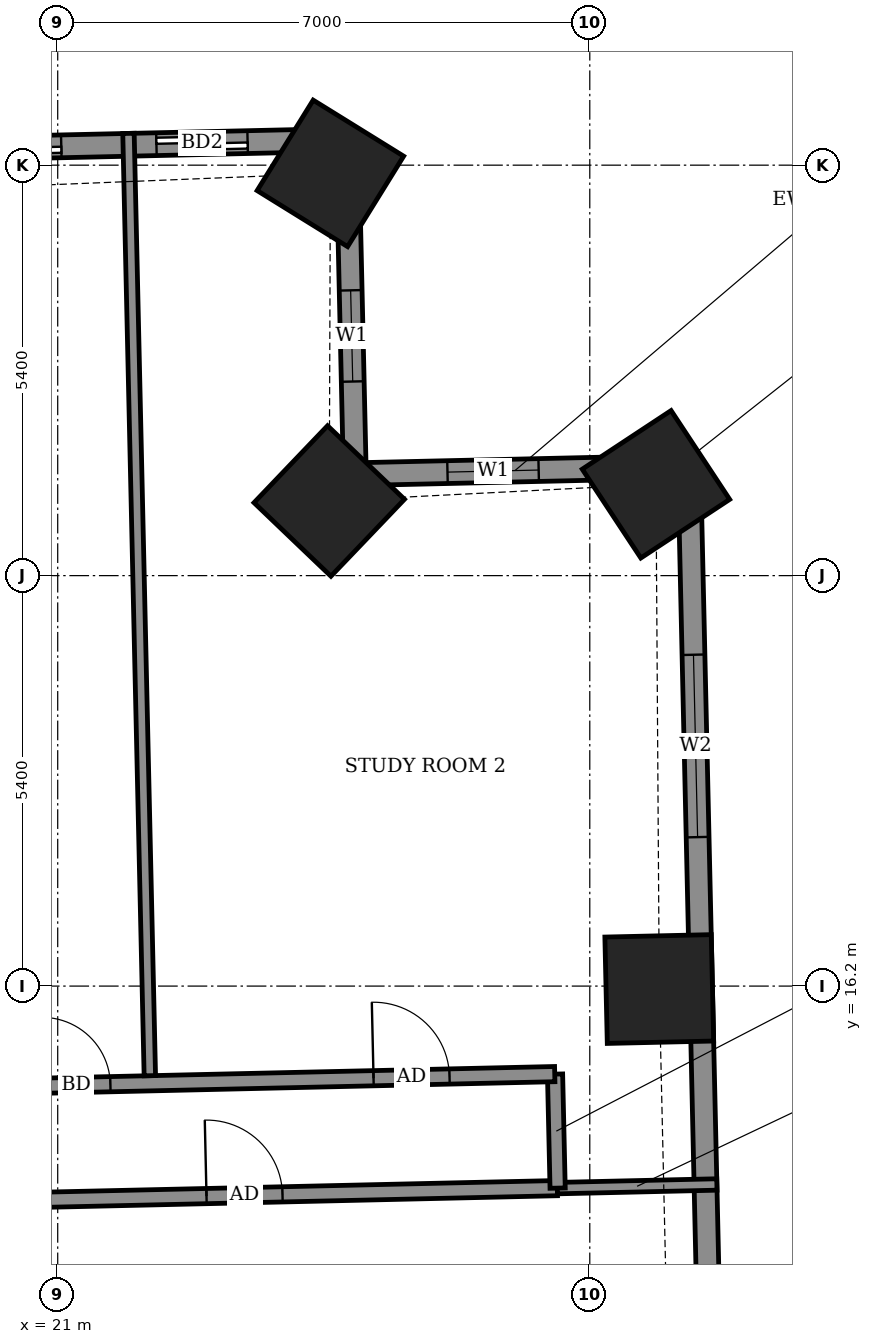
"""IFC4 building model, lengths in metres.
Left out: names, types, materials, properties, quantities, classifications, styles, units other than length and angle.
Written with IfcOpenShell. Run it as: python <this file> out.ifc"""

import sys

from ifc_helpers import new_model, si_unit, direction, frame, frame_2d, origin, origin_2d, place, context, subcontext, project, spatial, rectangle, extrude, element, fill, save


model = new_model("IFC4")
c1 = context("Model", 3, precision=1e-05, world=origin(), true_north=direction((0.0, 1.0)))
c2 = subcontext(c1, "Body", "Model", "MODEL_VIEW")
j1 = project(units=[si_unit("LENGTHUNIT", "METRE"), si_unit("PLANEANGLEUNIT", "RADIAN")], contexts=[c1])
p1 = place(None, origin())
s1 = spatial("IfcSite", under=j1, at=p1, CompositionType="ELEMENT")
p2 = place(p1, origin())
s2 = spatial("IfcBuilding", under=s1, at=p2, CompositionType="ELEMENT")
p3 = place(p2, frame((0.0, 0.0, 93.7)))
s3 = spatial("IfcBuildingStorey", under=s2, at=p3, CompositionType="ELEMENT", Elevation=93.7)
for number, where, z_axis, x_axis in (
    (1, (28.914, 16.161, -0.55), (0.0, 0.0, 1.0), (-0.023, 1.0, 0.0)),
    (2, (28.871, 22.802, -0.55), (0.0, 0.0, 1.0), (-0.551, 0.835, 0.0)),
    (3, (24.572, 22.582, -0.55), (0.0, 0.0, 1.0), (-0.723, 0.691, 0.0)),
    (4, (24.587, 26.892, -0.55), (0.0, 0.0, 1.0), (-0.85, 0.527, 0.0)),
):
    element("IfcColumn", number, at=place(p3, frame(where, z_axis=z_axis, x_axis=x_axis)), inside=s3, PredefinedType="COLUMN", context=c2, shape_type="SweptSolid", body=[
        extrude(rectangle(XDim=1.4, YDim=1.4, at=origin_2d()), origin(), (0.0, 0.0, 1.0), 3.6),
    ])
p4 = place(p3, frame((29.624, 9.108, 0.0), z_axis=(0.0, 0.0, 1.0), x_axis=(-0.022679601751, 0.999742784752, 0.0)))
e5 = element("IfcWall", 5, at=p4, inside=s3, PredefinedType="SOLIDWALL", context=c2, shape_type="SweptSolid", body=[
    extrude(rectangle(XDim=13.93, YDim=0.3, at=frame_2d((6.965, 0.0))), origin(), (0.0, 0.0, 1.0), 3.05),
])
p5 = place(p4, frame((1.742, 0.0, 0.0)))
e6 = element("IfcOpeningElement", 6, at=p5, cuts=e5, PredefinedType="OPENING", context=c2, shape_type="SweptSolid", body=[
    extrude(rectangle(XDim=1.5, YDim=2.4, at=frame_2d((0.75, 1.2))), frame((0.0, 0.16, 0.0), z_axis=(0.0, -1.0, 0.0), x_axis=(1.0, 0.0, 0.0)), (0.0, 0.0, 1.0), 0.32),
])
p6 = place(p4, frame((9.054, 0.0, 0.9)))
e7 = element("IfcOpeningElement", 7, at=p6, cuts=e5, PredefinedType="OPENING", context=c2, shape_type="SweptSolid", body=[
    extrude(rectangle(XDim=2.4, YDim=1.5, at=frame_2d((1.2, 0.75))), frame((0.0, 0.16, 0.0), z_axis=(0.0, -1.0, 0.0), x_axis=(1.0, 0.0, 0.0)), (0.0, 0.0, 1.0), 0.32),
])
p7 = place(p3, frame((29.308, 23.034, 0.0), z_axis=(0.0, 0.0, 1.0), x_axis=(-0.999742851358, -0.022676665496, 0.0)))
e8 = element("IfcWall", 8, at=p7, inside=s3, PredefinedType="SOLIDWALL", context=c2, shape_type="SweptSolid", body=[
    extrude(rectangle(XDim=4.586, YDim=0.3, at=frame_2d((2.293, 0.0))), origin(), (0.0, 0.0, 1.0), 2.55),
])
p8 = place(p7, frame((1.981, 0.0, 0.9)))
e9 = element("IfcOpeningElement", 9, at=p8, cuts=e8, PredefinedType="OPENING", context=c2, shape_type="SweptSolid", body=[
    extrude(rectangle(XDim=1.2, YDim=1.5, at=frame_2d((0.6, 0.75))), frame((0.0, 0.16, 0.0), z_axis=(0.0, -1.0, 0.0), x_axis=(1.0, 0.0, 0.0)), (0.0, 0.0, 1.0), 0.32),
])
p9 = place(p3, frame((24.909, 22.934, 0.0), z_axis=(0.0, 0.0, 1.0), x_axis=(-0.022693676786, 0.999742465355, 0.0)))
e10 = element("IfcWall", 10, at=p9, inside=s3, PredefinedType="SOLIDWALL", context=c2, shape_type="SweptSolid", body=[
    extrude(rectangle(XDim=4.4, YDim=0.3, at=frame_2d((2.2, 0.0))), origin(), (0.0, 0.0, 1.0), 2.55),
])
p10 = place(p9, frame((1.22, 0.0, 0.9)))
e11 = element("IfcOpeningElement", 11, at=p10, cuts=e10, PredefinedType="OPENING", context=c2, shape_type="SweptSolid", body=[
    extrude(rectangle(XDim=1.2, YDim=1.5, at=frame_2d((0.6, 0.75))), frame((0.0, 0.16, 0.0), z_axis=(0.0, -1.0, 0.0), x_axis=(1.0, 0.0, 0.0)), (0.0, 0.0, 1.0), 0.32),
])
p11 = place(p3, frame((24.809, 27.333, 0.0), z_axis=(0.0, 0.0, 1.0), x_axis=(-0.999742676884, -0.022684356233, 0.0)))
e12 = element("IfcWall", 12, at=p11, inside=s3, PredefinedType="SOLIDWALL", context=c2, shape_type="SweptSolid", body=[
    extrude(rectangle(XDim=47.301, YDim=0.3, at=frame_2d((23.651, 0.0))), origin(), (0.0, 0.0, 1.0), 3.05),
])
p12 = place(p11, frame((1.311, 0.0, 0.0)))
e13 = element("IfcOpeningElement", 13, at=p12, cuts=e12, PredefinedType="OPENING", context=c2, shape_type="SweptSolid", body=[
    extrude(rectangle(XDim=1.2, YDim=2.4, at=frame_2d((0.6, 1.2))), frame((0.0, 0.16, 0.0), z_axis=(0.0, -1.0, 0.0), x_axis=(1.0, 0.0, 0.0)), (0.0, 0.0, 1.0), 0.32),
])
p13 = place(p11, frame((3.763, 0.0, 0.0)))
e14 = element("IfcOpeningElement", 14, at=p13, cuts=e12, PredefinedType="OPENING", context=c2, shape_type="SweptSolid", body=[
    extrude(rectangle(XDim=1.5, YDim=2.4, at=frame_2d((0.75, 1.2))), frame((0.0, 0.16, 0.0), z_axis=(0.0, -1.0, 0.0), x_axis=(1.0, 0.0, 0.0)), (0.0, 0.0, 1.0), 0.32),
])
p14 = place(p11, frame((8.647, 0.0, 0.0)))
e15 = element("IfcOpeningElement", 15, at=p14, cuts=e12, PredefinedType="OPENING", context=c2, shape_type="SweptSolid", body=[
    extrude(rectangle(XDim=1.5, YDim=2.4, at=frame_2d((0.75, 1.2))), frame((0.0, 0.16, 0.0), z_axis=(0.0, -1.0, 0.0), x_axis=(1.0, 0.0, 0.0)), (0.0, 0.0, 1.0), 0.32),
])
p15 = place(p11, frame((14.239, 0.0, 0.0)))
e16 = element("IfcOpeningElement", 16, at=p15, cuts=e12, PredefinedType="OPENING", context=c2, shape_type="SweptSolid", body=[
    extrude(rectangle(XDim=1.2, YDim=2.4, at=frame_2d((0.6, 1.2))), frame((0.0, 0.16, 0.0), z_axis=(0.0, -1.0, 0.0), x_axis=(1.0, 0.0, 0.0)), (0.0, 0.0, 1.0), 0.32),
])
p16 = place(p11, frame((17.016, 0.0, 0.0)))
e17 = element("IfcOpeningElement", 17, at=p16, cuts=e12, PredefinedType="OPENING", context=c2, shape_type="SweptSolid", body=[
    extrude(rectangle(XDim=1.5, YDim=2.4, at=frame_2d((0.75, 1.2))), frame((0.0, 0.16, 0.0), z_axis=(0.0, -1.0, 0.0), x_axis=(1.0, 0.0, 0.0)), (0.0, 0.0, 1.0), 0.32),
])
p17 = place(p11, frame((21.816, 0.0, 0.0)))
e18 = element("IfcOpeningElement", 18, at=p17, cuts=e12, PredefinedType="OPENING", context=c2, shape_type="SweptSolid", body=[
    extrude(rectangle(XDim=1.5, YDim=2.4, at=frame_2d((0.75, 1.2))), frame((0.0, 0.16, 0.0), z_axis=(0.0, -1.0, 0.0), x_axis=(1.0, 0.0, 0.0)), (0.0, 0.0, 1.0), 0.32),
])
p18 = place(p11, frame((24.817, 0.0, 0.0)))
e19 = element("IfcOpeningElement", 19, at=p18, cuts=e12, PredefinedType="OPENING", context=c2, shape_type="SweptSolid", body=[
    extrude(rectangle(XDim=1.2, YDim=2.4, at=frame_2d((0.6, 1.2))), frame((0.0, 0.16, 0.0), z_axis=(0.0, -1.0, 0.0), x_axis=(1.0, 0.0, 0.0)), (0.0, 0.0, 1.0), 0.32),
])
p19 = place(p11, frame((30.244, 0.0, 0.0)))
e20 = element("IfcOpeningElement", 20, at=p19, cuts=e12, PredefinedType="OPENING", context=c2, shape_type="SweptSolid", body=[
    extrude(rectangle(XDim=1.5, YDim=2.4, at=frame_2d((0.75, 1.2))), frame((0.0, 0.16, 0.0), z_axis=(0.0, -1.0, 0.0), x_axis=(1.0, 0.0, 0.0)), (0.0, 0.0, 1.0), 0.32),
])
p20 = place(p11, frame((35.069, 0.0, 0.0)))
e21 = element("IfcOpeningElement", 21, at=p20, cuts=e12, PredefinedType="OPENING", context=c2, shape_type="SweptSolid", body=[
    extrude(rectangle(XDim=1.5, YDim=2.4, at=frame_2d((0.75, 1.2))), frame((0.0, 0.16, 0.0), z_axis=(0.0, -1.0, 0.0), x_axis=(1.0, 0.0, 0.0)), (0.0, 0.0, 1.0), 0.32),
])
p21 = place(p11, frame((37.995, 0.0, 0.0)))
e22 = element("IfcOpeningElement", 22, at=p21, cuts=e12, PredefinedType="OPENING", context=c2, shape_type="SweptSolid", body=[
    extrude(rectangle(XDim=1.5, YDim=2.4, at=frame_2d((0.75, 1.2))), frame((0.0, 0.16, 0.0), z_axis=(0.0, -1.0, 0.0), x_axis=(1.0, 0.0, 0.0)), (0.0, 0.0, 1.0), 0.32),
])
p22 = place(p11, frame((42.674, 0.0, 0.9)))
e23 = element("IfcOpeningElement", 23, at=p22, cuts=e12, PredefinedType="OPENING", context=c2, shape_type="SweptSolid", body=[
    extrude(rectangle(XDim=2.4, YDim=1.5, at=frame_2d((1.2, 0.75))), frame((0.0, 0.16, 0.0), z_axis=(0.0, -1.0, 0.0), x_axis=(1.0, 0.0, 0.0)), (0.0, 0.0, 1.0), 0.32),
])
p23 = place(p3, frame((17.176, 13.306, 0.0), z_axis=(0.0, 0.0, 1.0), x_axis=(0.999742295888, 0.022701141223, 0.0)))
e24 = element("IfcWall", 24, at=p23, inside=s3, PredefinedType="PARTITIONING", context=c2, shape_type="SweptSolid", body=[
    extrude(rectangle(XDim=10.4, YDim=0.2, at=frame_2d((5.2, 0.0))), origin(), (0.0, 0.0, 1.0), 3.05),
])
p24 = place(p23, frame((5.783, 0.0, 0.0)))
e25 = element("IfcOpeningElement", 25, at=p24, cuts=e24, PredefinedType="OPENING", context=c2, shape_type="SweptSolid", body=[
    extrude(rectangle(XDim=1.0, YDim=2.1, at=frame_2d((0.5, 1.05))), frame((0.0, 0.11, 0.0), z_axis=(0.0, -1.0, 0.0), x_axis=(1.0, 0.0, 0.0)), (0.0, 0.0, 1.0), 0.22),
])
p25 = place(p3, frame((27.573, 13.542, 0.0), z_axis=(0.0, 0.0, 1.0), x_axis=(0.999737616439, 0.022906293375, 0.0)))
e26 = element("IfcWall", 26, at=p25, inside=s3, PredefinedType="PARTITIONING", context=c2, shape_type="SweptSolid", body=[
    extrude(rectangle(XDim=2.1, YDim=0.15, at=frame_2d((1.05, 0.0))), origin(), (0.0, 0.0, 1.0), 2.55),
])
p26 = place(p3, frame((27.577, 13.542, 0.0), z_axis=(0.0, 0.0, 1.0), x_axis=(-0.022617910375, 0.999744182344, 0.0)))
e27 = element("IfcWall", 27, at=p26, inside=s3, PredefinedType="PARTITIONING", context=c2, shape_type="SweptSolid", body=[
    extrude(rectangle(XDim=1.5, YDim=0.2, at=frame_2d((0.75, 0.0))), origin(), (0.0, 0.0, 1.0), 3.05),
])
p27 = place(p3, frame((-24.92, 13.851, 0.0), z_axis=(0.0, 0.0, 1.0), x_axis=(0.999742411711, 0.022696039895, 0.0)))
e28 = element("IfcWall", 28, at=p27, inside=s3, PredefinedType="PARTITIONING", context=c2, shape_type="SweptSolid", body=[
    extrude(rectangle(XDim=52.472, YDim=0.2, at=frame_2d((26.236, 0.0))), origin(), (0.0, 0.0, 1.0), 3.05),
])
p28 = place(p27, frame((50.088, 0.0, 0.0)))
e29 = element("IfcOpeningElement", 29, at=p28, cuts=e28, PredefinedType="OPENING", context=c2, shape_type="SweptSolid", body=[
    extrude(rectangle(XDim=1.0, YDim=2.1, at=frame_2d((0.5, 1.05))), frame((0.0, 0.11, 0.0), z_axis=(0.0, -1.0, 0.0), x_axis=(1.0, 0.0, 0.0)), (0.0, 0.0, 1.0), 0.22),
])
p29 = place(p27, frame((45.725, 0.0, 0.0)))
e30 = element("IfcOpeningElement", 30, at=p29, cuts=e28, PredefinedType="OPENING", context=c2, shape_type="SweptSolid", body=[
    extrude(rectangle(XDim=0.9, YDim=2.1, at=frame_2d((0.45, 1.05))), frame((0.0, 0.11, 0.0), z_axis=(0.0, -1.0, 0.0), x_axis=(1.0, 0.0, 0.0)), (0.0, 0.0, 1.0), 0.22),
])
p30 = place(p27, frame((38.975, 0.0, 0.0)))
e31 = element("IfcOpeningElement", 31, at=p30, cuts=e28, PredefinedType="OPENING", context=c2, shape_type="SweptSolid", body=[
    extrude(rectangle(XDim=0.9, YDim=2.1, at=frame_2d((0.45, 1.05))), frame((0.0, 0.11, 0.0), z_axis=(0.0, -1.0, 0.0), x_axis=(1.0, 0.0, 0.0)), (0.0, 0.0, 1.0), 0.22),
])
p31 = place(p27, frame((37.05, 0.0, 0.0)))
e32 = element("IfcOpeningElement", 32, at=p31, cuts=e28, PredefinedType="OPENING", context=c2, shape_type="SweptSolid", body=[
    extrude(rectangle(XDim=0.9, YDim=2.1, at=frame_2d((0.45, 1.05))), frame((0.0, 0.11, 0.0), z_axis=(0.0, -1.0, 0.0), x_axis=(1.0, 0.0, 0.0)), (0.0, 0.0, 1.0), 0.22),
])
p32 = place(p27, frame((30.35, 0.0, 0.0)))
e33 = element("IfcOpeningElement", 33, at=p32, cuts=e28, PredefinedType="OPENING", context=c2, shape_type="SweptSolid", body=[
    extrude(rectangle(XDim=0.9, YDim=2.1, at=frame_2d((0.45, 1.05))), frame((0.0, 0.11, 0.0), z_axis=(0.0, -1.0, 0.0), x_axis=(1.0, 0.0, 0.0)), (0.0, 0.0, 1.0), 0.22),
])
p33 = place(p27, frame((28.4, 0.0, 0.0)))
e34 = element("IfcOpeningElement", 34, at=p33, cuts=e28, PredefinedType="OPENING", context=c2, shape_type="SweptSolid", body=[
    extrude(rectangle(XDim=0.9, YDim=2.1, at=frame_2d((0.45, 1.05))), frame((0.0, 0.11, 0.0), z_axis=(0.0, -1.0, 0.0), x_axis=(1.0, 0.0, 0.0)), (0.0, 0.0, 1.0), 0.22),
])
p34 = place(p27, frame((21.675, 0.0, 0.0)))
e35 = element("IfcOpeningElement", 35, at=p34, cuts=e28, PredefinedType="OPENING", context=c2, shape_type="SweptSolid", body=[
    extrude(rectangle(XDim=0.9, YDim=2.1, at=frame_2d((0.45, 1.05))), frame((0.0, 0.11, 0.0), z_axis=(0.0, -1.0, 0.0), x_axis=(1.0, 0.0, 0.0)), (0.0, 0.0, 1.0), 0.22),
])
p35 = place(p27, frame((19.775, 0.0, 0.0)))
e36 = element("IfcOpeningElement", 36, at=p35, cuts=e28, PredefinedType="OPENING", context=c2, shape_type="SweptSolid", body=[
    extrude(rectangle(XDim=0.9, YDim=2.1, at=frame_2d((0.45, 1.05))), frame((0.0, 0.11, 0.0), z_axis=(0.0, -1.0, 0.0), x_axis=(1.0, 0.0, 0.0)), (0.0, 0.0, 1.0), 0.22),
])
p36 = place(p27, frame((13.0, 0.0, 0.0)))
e37 = element("IfcOpeningElement", 37, at=p36, cuts=e28, PredefinedType="OPENING", context=c2, shape_type="SweptSolid", body=[
    extrude(rectangle(XDim=0.9, YDim=2.1, at=frame_2d((0.45, 1.05))), frame((0.0, 0.11, 0.0), z_axis=(0.0, -1.0, 0.0), x_axis=(1.0, 0.0, 0.0)), (0.0, 0.0, 1.0), 0.22),
])
p37 = place(p27, frame((11.075, 0.0, 0.0)))
e38 = element("IfcOpeningElement", 38, at=p37, cuts=e28, PredefinedType="OPENING", context=c2, shape_type="SweptSolid", body=[
    extrude(rectangle(XDim=0.9, YDim=2.1, at=frame_2d((0.45, 1.05))), frame((0.0, 0.11, 0.0), z_axis=(0.0, -1.0, 0.0), x_axis=(1.0, 0.0, 0.0)), (0.0, 0.0, 1.0), 0.22),
])
p38 = place(p27, frame((3.049, 0.0, 0.0)))
e39 = element("IfcOpeningElement", 39, at=p38, cuts=e28, PredefinedType="OPENING", context=c2, shape_type="SweptSolid", body=[
    extrude(rectangle(XDim=1.0, YDim=2.1, at=frame_2d((0.5, 1.05))), frame((0.0, 0.11, 0.0), z_axis=(0.0, -1.0, 0.0), x_axis=(1.0, 0.0, 0.0)), (0.0, 0.0, 1.0), 0.22),
])
p39 = place(p3, frame((22.212, 15.021, 0.0), z_axis=(0.0, 0.0, 1.0), x_axis=(-0.022661475803, 0.999743195783, 0.0)))
e40 = element("IfcWall", 40, at=p39, inside=s3, PredefinedType="PARTITIONING", context=c2, shape_type="SweptSolid", body=[
    extrude(rectangle(XDim=12.4, YDim=0.15, at=frame_2d((6.2, 0.0))), origin(), (0.0, 0.0, 1.0), 2.55),
])
p40 = place(p6, origin())
e41 = element("IfcWindow", 41, at=p40, inside=s3, PartitioningType="DOUBLE_PANEL_VERTICAL", PredefinedType="WINDOW", context=c2, shape_type="SweptSolid", body=[
    extrude(rectangle(XDim=2.4, YDim=1.5, at=frame_2d((1.2, 0.75))), frame((0.0, 0.03, 0.0), z_axis=(0.0, -1.0, 0.0), x_axis=(1.0, 0.0, 0.0)), (0.0, 0.0, 1.0), 0.06),
])
fill(e7, e41)
p41 = place(p8, origin())
e42 = element("IfcWindow", 42, at=p41, inside=s3, PartitioningType="SINGLE_PANEL", PredefinedType="WINDOW", context=c2, shape_type="SweptSolid", body=[
    extrude(rectangle(XDim=1.2, YDim=1.5, at=frame_2d((0.6, 0.75))), frame((0.0, 0.03, 0.0), z_axis=(0.0, -1.0, 0.0), x_axis=(1.0, 0.0, 0.0)), (0.0, 0.0, 1.0), 0.06),
])
fill(e9, e42)
p42 = place(p10, origin())
e43 = element("IfcWindow", 43, at=p42, inside=s3, PartitioningType="SINGLE_PANEL", PredefinedType="WINDOW", context=c2, shape_type="SweptSolid", body=[
    extrude(rectangle(XDim=1.2, YDim=1.5, at=frame_2d((0.6, 0.75))), frame((0.0, 0.03, 0.0), z_axis=(0.0, -1.0, 0.0), x_axis=(1.0, 0.0, 0.0)), (0.0, 0.0, 1.0), 0.06),
])
fill(e11, e43)
p43 = place(p12, origin())
e44 = element("IfcDoor", 44, at=p43, inside=s3, OperationType="SLIDING_TO_LEFT", PredefinedType="DOOR", context=c2, shape_type="SweptSolid", body=[
    extrude(rectangle(XDim=1.2, YDim=2.4, at=frame_2d((0.6, 1.2))), frame((0.0, 0.025, 0.0), z_axis=(0.0, -1.0, 0.0), x_axis=(1.0, 0.0, 0.0)), (0.0, 0.0, 1.0), 0.05),
])
fill(e13, e44)
p44 = place(p13, origin())
e45 = element("IfcDoor", 45, at=p44, inside=s3, OperationType="SLIDING_TO_LEFT", PredefinedType="DOOR", context=c2, shape_type="SweptSolid", body=[
    extrude(rectangle(XDim=1.5, YDim=2.4, at=frame_2d((0.75, 1.2))), frame((0.0, 0.025, 0.0), z_axis=(0.0, -1.0, 0.0), x_axis=(1.0, 0.0, 0.0)), (0.0, 0.0, 1.0), 0.05),
])
fill(e14, e45)
p45 = place(p24, origin())
e46 = element("IfcDoor", 46, at=p45, inside=s3, OperationType="SINGLE_SWING_RIGHT", PredefinedType="DOOR", context=c2, shape_type="SweptSolid", body=[
    extrude(rectangle(XDim=1.0, YDim=2.1, at=frame_2d((0.5, 1.05))), frame((0.0, 0.025, 0.0), z_axis=(0.0, -1.0, 0.0), x_axis=(1.0, 0.0, 0.0)), (0.0, 0.0, 1.0), 0.05),
])
fill(e25, e46)
p46 = place(p28, origin())
e47 = element("IfcDoor", 47, at=p46, inside=s3, OperationType="SINGLE_SWING_LEFT", PredefinedType="DOOR", context=c2, shape_type="SweptSolid", body=[
    extrude(rectangle(XDim=1.0, YDim=2.1, at=frame_2d((0.5, 1.05))), frame((0.0, 0.025, 0.0), z_axis=(0.0, -1.0, 0.0), x_axis=(1.0, 0.0, 0.0)), (0.0, 0.0, 1.0), 0.05),
])
fill(e29, e47)
p47 = place(p29, origin())
e48 = element("IfcDoor", 48, at=p47, inside=s3, OperationType="SINGLE_SWING_LEFT", PredefinedType="DOOR", context=c2, shape_type="SweptSolid", body=[
    extrude(rectangle(XDim=0.9, YDim=2.1, at=frame_2d((0.45, 1.05))), frame((0.0, 0.025, 0.0), z_axis=(0.0, -1.0, 0.0), x_axis=(1.0, 0.0, 0.0)), (0.0, 0.0, 1.0), 0.05),
])
fill(e30, e48)
save(model, sys.argv[1])
